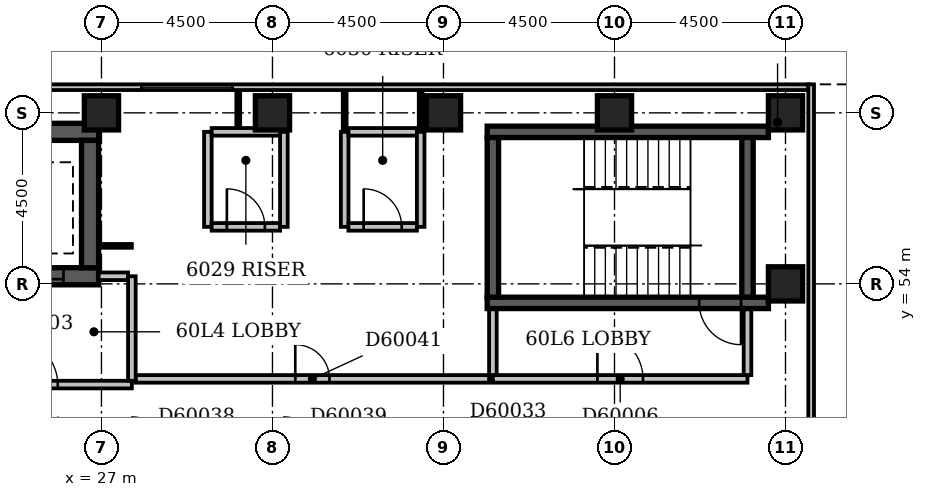
"""IFC4 building model, lengths in metres.
Left out: names, types, materials, properties, quantities, classifications, styles, units other than length and angle.
Written with IfcOpenShell. Run it as: python <this file> out.ifc"""

import sys

from ifc_helpers import new_model, si_unit, direction, frame, frame_2d, origin, origin_2d, place, context, subcontext, project, spatial, rectangle, extrude, element, fill, save


model = new_model("IFC4")
c1 = context("Model", 3, precision=1e-05, world=origin(), true_north=direction((0.0, 1.0)))
c2 = subcontext(c1, "Body", "Model", "MODEL_VIEW")
j1 = project(units=[si_unit("LENGTHUNIT", "METRE"), si_unit("PLANEANGLEUNIT", "RADIAN")], contexts=[c1])
p1 = place(None, origin())
s1 = spatial("IfcSite", under=j1, at=p1, CompositionType="ELEMENT")
p2 = place(p1, origin())
s2 = spatial("IfcBuilding", under=s1, at=p2, CompositionType="ELEMENT")
p3 = place(p2, frame((0.0, 0.0, 233.0)))
s3 = spatial("IfcBuildingStorey", under=s2, at=p3, CompositionType="ELEMENT", Elevation=233.0)
p4 = place(p3, frame((23.975, 54.2, -0.35), z_axis=(0.0, 0.0, 1.0), x_axis=(1.0, 0.0, 0.0)))
e1 = element("IfcWall", 1, at=p4, inside=s3, PredefinedType="SHEAR", context=c2, shape_type="SweptSolid", body=[
    extrude(rectangle(XDim=2.95, YDim=0.45, at=frame_2d((1.475, 0.0))), origin(), (0.0, 0.0, 1.0), 3.65),
])
p5 = place(p4, frame((0.925, 0.0, 0.35)))
e2 = element("IfcOpeningElement", 2, at=p5, cuts=e1, PredefinedType="OPENING", context=c2, shape_type="SweptSolid", body=[
    extrude(rectangle(XDim=1.1, YDim=2.1, at=frame_2d((0.55, 1.05))), frame((0.0, 0.237, 0.0), z_axis=(0.0, -1.0, 0.0), x_axis=(1.0, 0.0, 0.0)), (0.0, 0.0, 1.0), 0.474),
])
p6 = place(p3, frame((23.975, 58.0, -0.35), z_axis=(0.0, 0.0, 1.0), x_axis=(1.0, 0.0, 0.0)))
e3 = element("IfcWall", 3, at=p6, inside=s3, PredefinedType="SHEAR", context=c2, shape_type="SweptSolid", body=[
    extrude(rectangle(XDim=2.95, YDim=0.45, at=frame_2d((1.475, 0.0))), origin(), (0.0, 0.0, 1.0), 3.65),
])
p7 = place(p3, frame((26.7, 54.425, -0.35), z_axis=(0.0, 0.0, 1.0), x_axis=(0.0, 1.0, 0.0)))
e4 = element("IfcWall", 4, at=p7, inside=s3, PredefinedType="SHEAR", context=c2, shape_type="SweptSolid", body=[
    extrude(rectangle(XDim=3.35, YDim=0.45, at=frame_2d((1.675, 0.0))), origin(), (0.0, 0.0, 1.0), 3.65),
])
p8 = place(p3, frame((37.15, 53.5, -0.35), z_axis=(0.0, 0.0, 1.0), x_axis=(1.0, 0.0, 0.0)))
e5 = element("IfcWall", 5, at=p8, inside=s3, PredefinedType="SHEAR", context=c2, shape_type="SweptSolid", body=[
    extrude(rectangle(XDim=7.4, YDim=0.3, at=frame_2d((3.7, 0.0))), origin(), (0.0, 0.0, 1.0), 3.65),
])
p9 = place(p8, frame((5.58, 0.0, 0.35)))
e6 = element("IfcOpeningElement", 6, at=p9, cuts=e5, PredefinedType="OPENING", context=c2, shape_type="SweptSolid", body=[
    extrude(rectangle(XDim=1.1, YDim=2.1, at=frame_2d((0.55, 1.05))), frame((0.0, 0.162, 0.0), z_axis=(0.0, -1.0, 0.0), x_axis=(1.0, 0.0, 0.0)), (0.0, 0.0, 1.0), 0.324),
])
p10 = place(p3, frame((37.15, 58.0, -0.35), z_axis=(0.0, 0.0, 1.0), x_axis=(1.0, 0.0, 0.0)))
e7 = element("IfcWall", 7, at=p10, inside=s3, PredefinedType="SHEAR", context=c2, shape_type="SweptSolid", body=[
    extrude(rectangle(XDim=7.4, YDim=0.3, at=frame_2d((3.7, 0.0))), origin(), (0.0, 0.0, 1.0), 3.65),
])
for number, where, z_axis, x_axis in (
    (8, (37.3, 53.65, -0.35), (0.0, 0.0, 1.0), (0.0, 1.0, 0.0)),
    (9, (44.0, 53.65, -0.35), (0.0, 0.0, 1.0), (0.0, 1.0, 0.0)),
):
    element("IfcWall", number, at=place(p3, frame(where, z_axis=z_axis, x_axis=x_axis)), inside=s3, PredefinedType="SHEAR", context=c2, shape_type="SweptSolid", body=[
        extrude(rectangle(XDim=4.2, YDim=0.3, at=frame_2d((2.1, 0.0))), origin(), (0.0, 0.0, 1.0), 3.65),
    ])
for number, where, z_axis, x_axis in (
    (10, (45.0, 54.0, -0.35), (0.0, 0.0, 1.0), (1.0, 0.0, 0.0)),
    (11, (27.0, 58.5, -0.35), (0.0, 0.0, 1.0), (1.0, 0.0, 0.0)),
    (12, (31.5, 58.5, -0.35), (0.0, 0.0, 1.0), (1.0, 0.0, 0.0)),
    (13, (36.0, 58.5, -0.35), (0.0, 0.0, 1.0), (1.0, 0.0, 0.0)),
    (14, (40.5, 58.5, -0.35), (0.0, 0.0, 1.0), (1.0, 0.0, 0.0)),
    (15, (45.0, 58.5, -0.35), (0.0, 0.0, 1.0), (1.0, 0.0, 0.0)),
):
    element("IfcColumn", number, at=place(p3, frame(where, z_axis=z_axis, x_axis=x_axis)), inside=s3, PredefinedType="COLUMN", context=c2, shape_type="SweptSolid", body=[
        extrude(rectangle(XDim=0.9, YDim=0.9, at=origin_2d()), origin(), (0.0, 0.0, 1.0), 3.65),
    ])
p11 = place(p3, frame((45.675, 39.9, 0.0), z_axis=(0.0, 0.0, 1.0), x_axis=(0.0, 1.0, 0.0)))
e16 = element("IfcWall", 16, at=p11, inside=s3, PredefinedType="STANDARD", context=c2, shape_type="SweptSolid", body=[
    extrude(rectangle(XDim=19.35, YDim=0.15, at=frame_2d((9.675, 0.0))), origin(), (0.0, 0.0, 1.0), 2.7),
])
p12 = place(p11, frame((6.75, 0.0, 0.0)))
e17 = element("IfcOpeningElement", 17, at=p12, cuts=e16, PredefinedType="OPENING", context=c2, shape_type="SweptSolid", body=[
    extrude(rectangle(XDim=1.2, YDim=2.4, at=frame_2d((0.6, 1.2))), frame((0.0, 0.087, 0.0), z_axis=(0.0, -1.0, 0.0), x_axis=(1.0, 0.0, 0.0)), (0.0, 0.0, 1.0), 0.174),
])
p13 = place(p3, frame((45.6, 59.175, 0.0), z_axis=(0.0, 0.0, 1.0), x_axis=(-1.0, 0.0, 0.0)))
e18 = element("IfcWall", 18, at=p13, inside=s3, PredefinedType="STANDARD", context=c2, shape_type="SweptSolid", body=[
    extrude(rectangle(XDim=46.35, YDim=0.15, at=frame_2d((23.175, 0.0))), origin(), (0.0, 0.0, 1.0), 2.7),
])
p14 = place(p13, frame((15.15, 0.0, 0.6)))
e19 = element("IfcOpeningElement", 19, at=p14, cuts=e18, PredefinedType="OPENING", context=c2, shape_type="SweptSolid", body=[
    extrude(rectangle(XDim=2.4, YDim=1.8, at=frame_2d((1.2, 0.9))), frame((0.0, 0.087, 0.0), z_axis=(0.0, -1.0, 0.0), x_axis=(1.0, 0.0, 0.0)), (0.0, 0.0, 1.0), 0.174),
])
p15 = place(p3, frame((23.0, 51.35, 0.0), z_axis=(0.0, 0.0, 1.0), x_axis=(1.0, 0.0, 0.0)))
e20 = element("IfcWall", 20, at=p15, inside=s3, PredefinedType="PARTITIONING", context=c2, shape_type="SweptSolid", body=[
    extrude(rectangle(XDim=4.8, YDim=0.2, at=frame_2d((2.4, 0.0))), origin(), (0.0, 0.0, 1.0), 3.3),
])
p16 = place(p15, frame((1.65, 0.0, 0.0)))
e21 = element("IfcOpeningElement", 21, at=p16, cuts=e20, PredefinedType="OPENING", context=c2, shape_type="SweptSolid", body=[
    extrude(rectangle(XDim=1.2, YDim=2.1, at=frame_2d((0.6, 1.05))), frame((0.0, 0.112, 0.0), z_axis=(0.0, -1.0, 0.0), x_axis=(1.0, 0.0, 0.0)), (0.0, 0.0, 1.0), 0.224),
])
p17 = place(p3, frame((27.8, 51.45, 0.0), z_axis=(0.0, 0.0, 1.0), x_axis=(0.0, 1.0, 0.0)))
e22 = element("IfcWall", 22, at=p17, inside=s3, PredefinedType="PARTITIONING", context=c2, shape_type="SweptSolid", body=[
    extrude(rectangle(XDim=2.75, YDim=0.2, at=frame_2d((1.375, 0.0))), origin(), (0.0, 0.0, 1.0), 3.3),
])
p18 = place(p3, frame((26.925, 54.2, 0.0), z_axis=(0.0, 0.0, 1.0), x_axis=(1.0, 0.0, 0.0)))
e23 = element("IfcWall", 23, at=p18, inside=s3, PredefinedType="PARTITIONING", context=c2, shape_type="SweptSolid", body=[
    extrude(rectangle(XDim=0.775, YDim=0.2, at=frame_2d((0.387, 0.0))), origin(), (0.0, 0.0, 1.0), 3.3),
])
p19 = place(p3, frame((37.3, 51.5, 0.0), z_axis=(0.0, 0.0, 1.0), x_axis=(1.0, 0.0, 0.0)))
e24 = element("IfcWall", 24, at=p19, inside=s3, PredefinedType="PARTITIONING", context=c2, shape_type="SweptSolid", body=[
    extrude(rectangle(XDim=6.7, YDim=0.2, at=frame_2d((3.35, 0.0))), origin(), (0.0, 0.0, 1.0), 3.3),
])
p20 = place(p19, frame((2.75, 0.0, 0.0)))
e25 = element("IfcOpeningElement", 25, at=p20, cuts=e24, PredefinedType="OPENING", context=c2, shape_type="SweptSolid", body=[
    extrude(rectangle(XDim=1.2, YDim=2.1, at=frame_2d((0.6, 1.05))), frame((0.0, 0.112, 0.0), z_axis=(0.0, -1.0, 0.0), x_axis=(1.0, 0.0, 0.0)), (0.0, 0.0, 1.0), 0.224),
])
for number, where, z_axis, x_axis in (
    (26, (44.0, 51.6, 0.0), (0.0, 0.0, 1.0), (0.0, 1.0, 0.0)),
    (27, (37.3, 51.6, 0.0), (0.0, 0.0, 1.0), (0.0, 1.0, 0.0)),
):
    element("IfcWall", number, at=place(p3, frame(where, z_axis=z_axis, x_axis=x_axis)), inside=s3, PredefinedType="PARTITIONING", context=c2, shape_type="SweptSolid", body=[
        extrude(rectangle(XDim=1.73, YDim=0.2, at=frame_2d((0.865, 0.0))), origin(), (0.0, 0.0, 1.0), 3.3),
    ])
p21 = place(p3, frame((27.9, 51.5, 0.0), z_axis=(0.0, 0.0, 1.0), x_axis=(1.0, 0.0, 0.0)))
e28 = element("IfcWall", 28, at=p21, inside=s3, PredefinedType="PARTITIONING", context=c2, shape_type="SweptSolid", body=[
    extrude(rectangle(XDim=9.3, YDim=0.2, at=frame_2d((4.65, 0.0))), origin(), (0.0, 0.0, 1.0), 3.3),
])
p22 = place(p21, frame((4.2, 0.0, 0.0)))
e29 = element("IfcOpeningElement", 29, at=p22, cuts=e28, PredefinedType="OPENING", context=c2, shape_type="SweptSolid", body=[
    extrude(rectangle(XDim=0.9, YDim=2.1, at=frame_2d((0.45, 1.05))), frame((0.0, 0.112, 0.0), z_axis=(0.0, -1.0, 0.0), x_axis=(1.0, 0.0, 0.0)), (0.0, 0.0, 1.0), 0.224),
])
p23 = place(p3, frame((26.925, 55.0, 0.0), z_axis=(0.0, 0.0, 1.0), x_axis=(1.0, 0.0, 0.0)))
e30 = element("IfcWall", 30, at=p23, inside=s3, PredefinedType="PARTITIONING", context=c2, shape_type="SweptSolid", body=[
    extrude(rectangle(XDim=0.875, YDim=0.1, at=frame_2d((0.438, 0.0))), origin(), (0.0, 0.0, 1.0), 3.3),
])
p24 = place(p3, frame((29.8, 55.5, 0.0), z_axis=(0.0, 0.0, 1.0), x_axis=(0.0, 1.0, 0.0)))
e31 = element("IfcWall", 31, at=p24, inside=s3, PredefinedType="PARTITIONING", context=c2, shape_type="SweptSolid", body=[
    extrude(rectangle(XDim=2.5, YDim=0.2, at=frame_2d((1.25, 0.0))), origin(), (0.0, 0.0, 1.0), 3.3),
])
p25 = place(p3, frame((29.9, 55.5, 0.0), z_axis=(0.0, 0.0, 1.0), x_axis=(1.0, 0.0, 0.0)))
e32 = element("IfcWall", 32, at=p25, inside=s3, PredefinedType="PARTITIONING", context=c2, shape_type="SweptSolid", body=[
    extrude(rectangle(XDim=1.8, YDim=0.2, at=frame_2d((0.9, 0.0))), origin(), (0.0, 0.0, 1.0), 3.3),
])
p26 = place(p25, frame((0.4, 0.0, 0.0)))
e33 = element("IfcOpeningElement", 33, at=p26, cuts=e32, PredefinedType="OPENING", context=c2, shape_type="SweptSolid", body=[
    extrude(rectangle(XDim=1.0, YDim=2.1, at=frame_2d((0.5, 1.05))), frame((0.0, 0.112, 0.0), z_axis=(0.0, -1.0, 0.0), x_axis=(1.0, 0.0, 0.0)), (0.0, 0.0, 1.0), 0.224),
])
for number, where, z_axis, x_axis in (
    (34, (31.8, 55.5, 0.0), (0.0, 0.0, 1.0), (0.0, 1.0, 0.0)),
    (35, (33.4, 55.5, 0.0), (0.0, 0.0, 1.0), (0.0, 1.0, 0.0)),
):
    element("IfcWall", number, at=place(p3, frame(where, z_axis=z_axis, x_axis=x_axis)), inside=s3, PredefinedType="PARTITIONING", context=c2, shape_type="SweptSolid", body=[
        extrude(rectangle(XDim=2.5, YDim=0.2, at=frame_2d((1.25, 0.0))), origin(), (0.0, 0.0, 1.0), 3.3),
    ])
p27 = place(p3, frame((33.5, 55.5, 0.0), z_axis=(0.0, 0.0, 1.0), x_axis=(1.0, 0.0, 0.0)))
e36 = element("IfcWall", 36, at=p27, inside=s3, PredefinedType="PARTITIONING", context=c2, shape_type="SweptSolid", body=[
    extrude(rectangle(XDim=1.8, YDim=0.2, at=frame_2d((0.9, 0.0))), origin(), (0.0, 0.0, 1.0), 3.3),
])
p28 = place(p27, frame((0.4, 0.0, 0.0)))
e37 = element("IfcOpeningElement", 37, at=p28, cuts=e36, PredefinedType="OPENING", context=c2, shape_type="SweptSolid", body=[
    extrude(rectangle(XDim=1.0, YDim=2.1, at=frame_2d((0.5, 1.05))), frame((0.0, 0.112, 0.0), z_axis=(0.0, -1.0, 0.0), x_axis=(1.0, 0.0, 0.0)), (0.0, 0.0, 1.0), 0.224),
])
p29 = place(p3, frame((35.4, 55.5, 0.0), z_axis=(0.0, 0.0, 1.0), x_axis=(0.0, 1.0, 0.0)))
e38 = element("IfcWall", 38, at=p29, inside=s3, PredefinedType="PARTITIONING", context=c2, shape_type="SweptSolid", body=[
    extrude(rectangle(XDim=2.5, YDim=0.2, at=frame_2d((1.25, 0.0))), origin(), (0.0, 0.0, 1.0), 2.4),
])
p30 = place(p3, frame((29.9, 58.0, 0.0), z_axis=(0.0, 0.0, 1.0), x_axis=(1.0, 0.0, 0.0)))
e39 = element("IfcWall", 39, at=p30, inside=s3, PredefinedType="PARTITIONING", context=c2, shape_type="SweptSolid", body=[
    extrude(rectangle(XDim=1.8, YDim=0.2, at=frame_2d((0.9, 0.0))), origin(), (0.0, 0.0, 1.0), 3.3),
])
p31 = place(p3, frame((33.4, 58.0, 0.0), z_axis=(0.0, 0.0, 1.0), x_axis=(0.0, 1.0, 0.0)))
e40 = element("IfcWall", 40, at=p31, inside=s3, PredefinedType="PARTITIONING", context=c2, shape_type="SweptSolid", body=[
    extrude(rectangle(XDim=1.1, YDim=0.1, at=frame_2d((0.55, 0.0))), origin(), (0.0, 0.0, 1.0), 3.3),
])
p32 = place(p3, frame((33.5, 58.0, 0.0), z_axis=(0.0, 0.0, 1.0), x_axis=(1.0, 0.0, 0.0)))
e41 = element("IfcWall", 41, at=p32, inside=s3, PredefinedType="PARTITIONING", context=c2, shape_type="SweptSolid", body=[
    extrude(rectangle(XDim=1.8, YDim=0.2, at=frame_2d((0.9, 0.0))), origin(), (0.0, 0.0, 1.0), 3.3),
])
p33 = place(p3, frame((35.4, 58.0, 0.0), z_axis=(0.0, 0.0, 1.0), x_axis=(0.0, 1.0, 0.0)))
e42 = element("IfcWall", 42, at=p33, inside=s3, PredefinedType="PARTITIONING", context=c2, shape_type="SweptSolid", body=[
    extrude(rectangle(XDim=1.1, YDim=0.1, at=frame_2d((0.55, 0.0))), origin(), (0.0, 0.0, 1.0), 2.4),
])
p34 = place(p3, frame((30.6, 58.1, 0.0), z_axis=(0.0, 0.0, 1.0), x_axis=(0.0, 1.0, 0.0)))
e43 = element("IfcWall", 43, at=p34, inside=s3, PredefinedType="PARTITIONING", context=c2, shape_type="SweptSolid", body=[
    extrude(rectangle(XDim=1.0, YDim=0.1, at=frame_2d((0.5, 0.0))), origin(), (0.0, 0.0, 1.0), 3.3),
])
p35 = place(p14, origin())
e44 = element("IfcWindow", 44, at=p35, inside=s3, PartitioningType="SINGLE_PANEL", PredefinedType="WINDOW", context=c2, shape_type="SweptSolid", body=[
    extrude(rectangle(XDim=2.4, YDim=1.8, at=frame_2d((1.2, 0.9))), frame((0.0, 0.03, 0.0), z_axis=(0.0, -1.0, 0.0), x_axis=(1.0, 0.0, 0.0)), (0.0, 0.0, 1.0), 0.06),
])
fill(e19, e44)
p36 = place(p16, origin())
e45 = element("IfcDoor", 45, at=p36, inside=s3, OperationType="SINGLE_SWING_LEFT", PredefinedType="DOOR", context=c2, shape_type="SweptSolid", body=[
    extrude(rectangle(XDim=1.2, YDim=2.1, at=frame_2d((0.6, 1.05))), frame((0.0, 0.025, 0.0), z_axis=(0.0, -1.0, 0.0), x_axis=(1.0, 0.0, 0.0)), (0.0, 0.0, 1.0), 0.05),
])
fill(e21, e45)
p37 = place(p5, origin())
e46 = element("IfcDoor", 46, at=p37, inside=s3, OperationType="SLIDING_TO_LEFT", PredefinedType="DOOR", context=c2, shape_type="SweptSolid", body=[
    extrude(rectangle(XDim=1.1, YDim=2.1, at=frame_2d((0.55, 1.05))), frame((0.0, 0.025, 0.0), z_axis=(0.0, -1.0, 0.0), x_axis=(1.0, 0.0, 0.0)), (0.0, 0.0, 1.0), 0.05),
])
fill(e2, e46)
p38 = place(p20, origin())
e47 = element("IfcDoor", 47, at=p38, inside=s3, OperationType="SINGLE_SWING_LEFT", PredefinedType="DOOR", context=c2, shape_type="SweptSolid", body=[
    extrude(rectangle(XDim=1.2, YDim=2.1, at=frame_2d((0.6, 1.05))), frame((0.0, 0.025, 0.0), z_axis=(0.0, -1.0, 0.0), x_axis=(1.0, 0.0, 0.0)), (0.0, 0.0, 1.0), 0.05),
])
fill(e25, e47)
p39 = place(p9, origin())
e48 = element("IfcDoor", 48, at=p39, inside=s3, OperationType="SINGLE_SWING_RIGHT", PredefinedType="DOOR", context=c2, shape_type="SweptSolid", body=[
    extrude(rectangle(XDim=1.1, YDim=2.1, at=frame_2d((0.55, 1.05))), frame((0.0, 0.025, 0.0), z_axis=(0.0, -1.0, 0.0), x_axis=(1.0, 0.0, 0.0)), (0.0, 0.0, 1.0), 0.05),
])
fill(e6, e48)
p40 = place(p22, origin())
e49 = element("IfcDoor", 49, at=p40, inside=s3, OperationType="SINGLE_SWING_LEFT", PredefinedType="DOOR", context=c2, shape_type="SweptSolid", body=[
    extrude(rectangle(XDim=0.9, YDim=2.1, at=frame_2d((0.45, 1.05))), frame((0.0, 0.025, 0.0), z_axis=(0.0, -1.0, 0.0), x_axis=(1.0, 0.0, 0.0)), (0.0, 0.0, 1.0), 0.05),
])
fill(e29, e49)
p41 = place(p26, origin())
e50 = element("IfcDoor", 50, at=p41, inside=s3, OperationType="SINGLE_SWING_LEFT", PredefinedType="DOOR", context=c2, shape_type="SweptSolid", body=[
    extrude(rectangle(XDim=1.0, YDim=2.1, at=frame_2d((0.5, 1.05))), frame((0.0, 0.025, 0.0), z_axis=(0.0, -1.0, 0.0), x_axis=(1.0, 0.0, 0.0)), (0.0, 0.0, 1.0), 0.05),
])
fill(e33, e50)
p42 = place(p28, origin())
e51 = element("IfcDoor", 51, at=p42, inside=s3, OperationType="SINGLE_SWING_LEFT", PredefinedType="DOOR", context=c2, shape_type="SweptSolid", body=[
    extrude(rectangle(XDim=1.0, YDim=2.1, at=frame_2d((0.5, 1.05))), frame((0.0, 0.025, 0.0), z_axis=(0.0, -1.0, 0.0), x_axis=(1.0, 0.0, 0.0)), (0.0, 0.0, 1.0), 0.05),
])
fill(e37, e51)
save(model, sys.argv[1])
